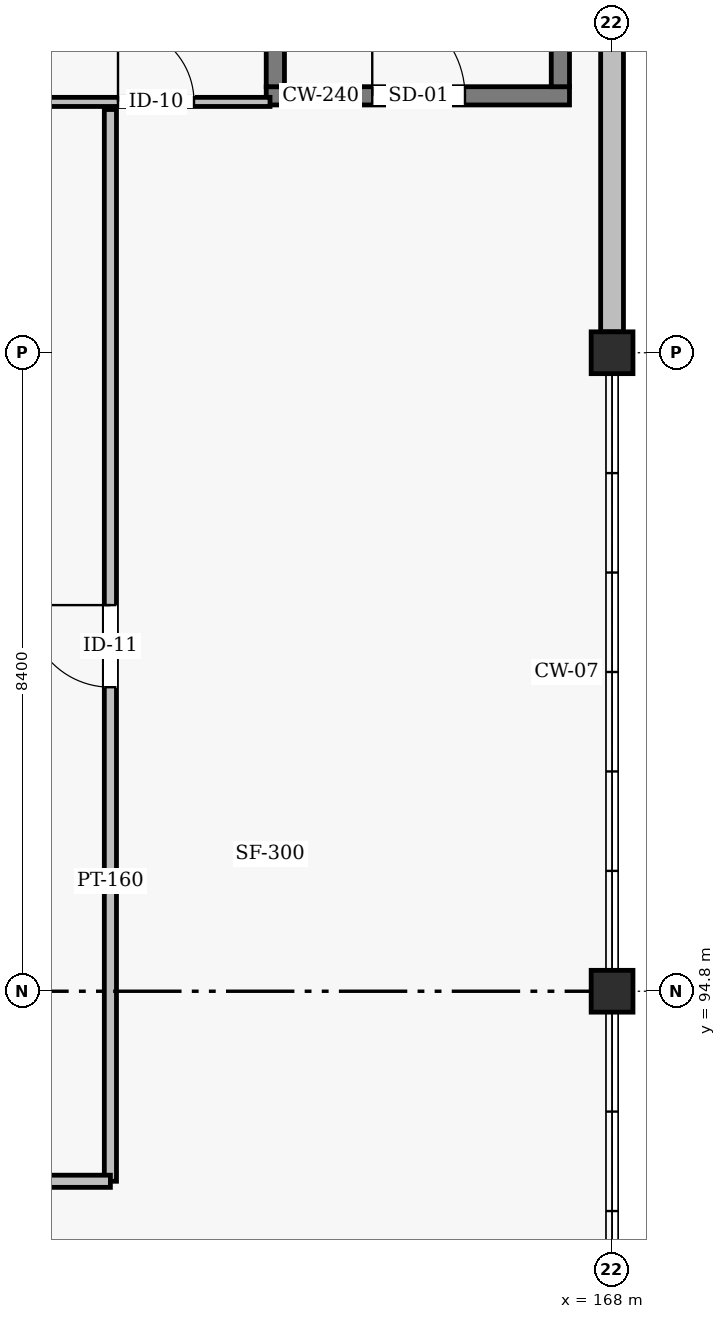
"""IFC4 building model, lengths in metres.
Left out: names, types, materials, properties, quantities, classifications, styles, units other than length and angle.
Written with IfcOpenShell. Run it as: python <this file> out.ifc"""

import sys

from ifc_helpers import new_model, si_unit, direction, frame, frame_2d, origin, origin_2d, place, context, subcontext, project, spatial, rectangle, hollow_rectangle, extrude, element, fill, save


model = new_model("IFC4")
c1 = context("Model", 3, precision=1e-05, world=origin(), true_north=direction((0.0, 1.0)))
c2 = subcontext(c1, "Body", "Model", "MODEL_VIEW")
j1 = project(units=[si_unit("LENGTHUNIT", "METRE"), si_unit("PLANEANGLEUNIT", "RADIAN")], contexts=[c1])
p1 = place(None, origin())
s1 = spatial("IfcSite", under=j1, at=p1, CompositionType="ELEMENT")
p2 = place(p1, origin())
s2 = spatial("IfcBuilding", under=s1, at=p2, CompositionType="ELEMENT")
p3 = place(p2, frame((0.0, 0.0, 21.0)))
s3 = spatial("IfcBuildingStorey", under=s2, at=p3, CompositionType="ELEMENT", Elevation=21.0)
for number, where, z_axis, x_axis in (
    (1, (168.0, 94.8, 0.0), (0.0, 0.0, 1.0), (1.0, 0.0, 0.0)),
    (2, (168.0, 103.2, 0.0), (0.0, 0.0, 1.0), (1.0, 0.0, 0.0)),
):
    element("IfcColumn", number, at=place(p3, frame(where, z_axis=z_axis, x_axis=x_axis)), inside=s3, PredefinedType="COLUMN", context=c2, shape_type="SweptSolid", body=[
        extrude(hollow_rectangle(XDim=0.55, YDim=0.55, WallThickness=0.022, InnerFilletRadius=0.022, OuterFilletRadius=0.044, at=origin_2d()), origin(), (0.0, 0.0, 1.0), 3.6),
    ])
p4 = place(p3, frame((168.0, 103.475, 0.0), z_axis=(0.0, 0.0, 1.0), x_axis=(0.0, 1.0, 0.0)))
e3 = element("IfcWall", 3, at=p4, inside=s3, PredefinedType="SOLIDWALL", context=c2, shape_type="SweptSolid", body=[
    extrude(rectangle(XDim=11.45, YDim=0.3, at=frame_2d((5.725, 0.0))), origin(), (0.0, 0.0, 1.0), 2.558),
])
p5 = place(p3, frame((163.45, 106.58, 0.0), z_axis=(0.0, 0.0, 1.0), x_axis=(1.0, 0.0, 0.0)))
e4 = element("IfcWall", 4, at=p5, inside=s3, PredefinedType="SHEAR", context=c2, shape_type="SweptSolid", body=[
    extrude(rectangle(XDim=3.99, YDim=0.24, at=frame_2d((1.995, 0.0))), origin(), (0.0, 0.0, 1.0), 3.35),
])
p6 = place(p5, frame((1.395, 0.0, 0.0)))
e5 = element("IfcOpeningElement", 5, at=p6, cuts=e4, PredefinedType="OPENING", context=c2, shape_type="SweptSolid", body=[
    extrude(rectangle(XDim=1.22, YDim=2.18, at=frame_2d((0.61, 1.09))), frame((0.0, 0.13, 0.0), z_axis=(0.0, -1.0, 0.0), x_axis=(1.0, 0.0, 0.0)), (0.0, 0.0, 1.0), 0.26),
])
for number, where, z_axis, x_axis in (
    (6, (163.57, 106.7, 0.0), (0.0, 0.0, 1.0), (0.0, 1.0, 0.0)),
    (7, (167.32, 106.7, 0.0), (0.0, 0.0, 1.0), (0.0, 1.0, 0.0)),
):
    element("IfcWall", number, at=place(p3, frame(where, z_axis=z_axis, x_axis=x_axis)), inside=s3, PredefinedType="SHEAR", context=c2, shape_type="SweptSolid", body=[
        extrude(rectangle(XDim=7.9, YDim=0.24, at=frame_2d((3.95, 0.0))), origin(), (0.0, 0.0, 1.0), 3.35),
    ])
p7 = place(p3, frame((160.5, 106.5, 0.0), z_axis=(0.0, 0.0, 1.0), x_axis=(1.0, 0.0, 0.0)))
e8 = element("IfcWall", 8, at=p7, inside=s3, PredefinedType="PARTITIONING", context=c2, shape_type="SweptSolid", body=[
    extrude(rectangle(XDim=3.0, YDim=0.12, at=frame_2d((1.5, 0.0))), origin(), (0.0, 0.0, 1.0), 3.35),
])
p8 = place(p7, frame((1.0, 0.0, 0.0)))
e9 = element("IfcOpeningElement", 9, at=p8, cuts=e8, PredefinedType="OPENING", context=c2, shape_type="SweptSolid", body=[
    extrude(rectangle(XDim=1.0, YDim=2.1, at=frame_2d((0.5, 1.05))), frame((0.0, 0.07, 0.0), z_axis=(0.0, -1.0, 0.0), x_axis=(1.0, 0.0, 0.0)), (0.0, 0.0, 1.0), 0.14),
])
p9 = place(p3, frame((161.4, 92.3, 0.0), z_axis=(0.0, 0.0, 1.0), x_axis=(0.0, 1.0, 0.0)))
e10 = element("IfcWall", 10, at=p9, inside=s3, PredefinedType="PARTITIONING", context=c2, shape_type="SweptSolid", body=[
    extrude(rectangle(XDim=14.1, YDim=0.16, at=frame_2d((7.05, 0.0))), origin(), (0.0, 0.0, 1.0), 2.75),
])
p10 = place(p9, frame((6.5, 0.0, 0.0)))
e11 = element("IfcOpeningElement", 11, at=p10, cuts=e10, PredefinedType="OPENING", context=c2, shape_type="SweptSolid", body=[
    extrude(rectangle(XDim=1.08, YDim=2.08, at=frame_2d((0.54, 1.04))), frame((0.0, 0.09, 0.0), z_axis=(0.0, -1.0, 0.0), x_axis=(1.0, 0.0, 0.0)), (0.0, 0.0, 1.0), 0.18),
])
p11 = place(p3, frame((142.0, 92.3, 0.0), z_axis=(0.0, 0.0, 1.0), x_axis=(1.0, 0.0, 0.0)))
e12 = element("IfcWall", 12, at=p11, inside=s3, PredefinedType="PARTITIONING", context=c2, shape_type="SweptSolid", body=[
    extrude(rectangle(XDim=19.4, YDim=0.16, at=frame_2d((9.7, 0.0))), origin(), (0.0, 0.0, 1.0), 2.85),
])
p12 = place(p11, frame((9.1, 0.0, 0.0)))
e13 = element("IfcOpeningElement", 13, at=p12, cuts=e12, PredefinedType="OPENING", context=c2, shape_type="SweptSolid", body=[
    extrude(rectangle(XDim=1.25, YDim=2.12, at=frame_2d((0.625, 1.06))), frame((0.0, 0.09, 0.0), z_axis=(0.0, -1.0, 0.0), x_axis=(1.0, 0.0, 0.0)), (0.0, 0.0, 1.0), 0.18),
])
p13 = place(p6, origin())
e14 = element("IfcDoor", 14, at=p13, inside=s3, OperationType="SINGLE_SWING_LEFT", PredefinedType="DOOR", context=c2, shape_type="SweptSolid", body=[
    extrude(rectangle(XDim=1.22, YDim=2.18, at=frame_2d((0.61, 1.09))), frame((0.0, 0.025, 0.0), z_axis=(0.0, -1.0, 0.0), x_axis=(1.0, 0.0, 0.0)), (0.0, 0.0, 1.0), 0.05),
])
fill(e5, e14)
p14 = place(p8, origin())
e15 = element("IfcDoor", 15, at=p14, inside=s3, OperationType="SINGLE_SWING_LEFT", PredefinedType="DOOR", context=c2, shape_type="SweptSolid", body=[
    extrude(rectangle(XDim=1.0, YDim=2.1, at=frame_2d((0.5, 1.05))), frame((0.0, 0.025, 0.0), z_axis=(0.0, -1.0, 0.0), x_axis=(1.0, 0.0, 0.0)), (0.0, 0.0, 1.0), 0.05),
])
fill(e9, e15)
p15 = place(p10, origin())
e16 = element("IfcDoor", 16, at=p15, inside=s3, OperationType="SINGLE_SWING_RIGHT", PredefinedType="DOOR", context=c2, shape_type="SweptSolid", body=[
    extrude(rectangle(XDim=1.08, YDim=2.08, at=frame_2d((0.54, 1.04))), frame((0.0, 0.025, 0.0), z_axis=(0.0, -1.0, 0.0), x_axis=(1.0, 0.0, 0.0)), (0.0, 0.0, 1.0), 0.05),
])
fill(e11, e16)
save(model, sys.argv[1])
